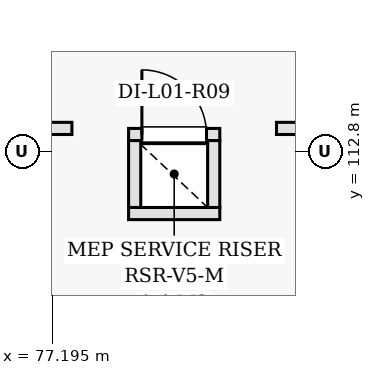
"""IFC4 building model, lengths in metres.
Left out: names, types, materials, properties, quantities, classifications, styles, units other than length and angle.
Written with IfcOpenShell. Run it as: python <this file> out.ifc"""

import sys

from ifc_helpers import new_model, si_unit, direction, frame, frame_2d, origin, place, context, subcontext, project, spatial, rectangle, extrude, element, fill, save


model = new_model("IFC4")
c1 = context("Model", 3, precision=1e-05, world=origin(), true_north=direction((0.0, 1.0)))
c2 = subcontext(c1, "Body", "Model", "MODEL_VIEW")
j1 = project(units=[si_unit("LENGTHUNIT", "METRE"), si_unit("PLANEANGLEUNIT", "RADIAN")], contexts=[c1])
p1 = place(None, origin())
s1 = spatial("IfcSite", under=j1, at=p1, CompositionType="ELEMENT")
p2 = place(p1, origin())
s2 = spatial("IfcBuilding", under=s1, at=p2, CompositionType="ELEMENT")
p3 = place(p2, frame((0.0, 0.0, 4.8)))
s3 = spatial("IfcBuildingStorey", under=s2, at=p3, CompositionType="ELEMENT", Elevation=4.8)
p4 = place(p3, frame((78.2, 111.98, 0.0), z_axis=(0.0, 0.0, 1.0), x_axis=(1.0, 0.0, 0.0)))
e1 = element("IfcWall", 1, at=p4, inside=s3, PredefinedType="PARTITIONING", context=c2, shape_type="SweptSolid", body=[
    extrude(rectangle(XDim=1.2, YDim=0.16, at=frame_2d((0.6, 0.0))), origin(), (0.0, 0.0, 1.0), 4.48),
])
p5 = place(p3, frame((78.2, 113.02, 0.0), z_axis=(0.0, 0.0, 1.0), x_axis=(1.0, 0.0, 0.0)))
e2 = element("IfcWall", 2, at=p5, inside=s3, PredefinedType="PARTITIONING", context=c2, shape_type="SweptSolid", body=[
    extrude(rectangle(XDim=1.2, YDim=0.16, at=frame_2d((0.6, 0.0))), origin(), (0.0, 0.0, 1.0), 4.48),
])
p6 = place(p5, frame((0.175, 0.0, 0.0)))
e3 = element("IfcOpeningElement", 3, at=p6, cuts=e2, PredefinedType="OPENING", context=c2, shape_type="SweptSolid", body=[
    extrude(rectangle(XDim=0.85, YDim=2.02, at=frame_2d((0.425, 1.01))), frame((0.0, 0.09, 0.0), z_axis=(0.0, -1.0, 0.0), x_axis=(1.0, 0.0, 0.0)), (0.0, 0.0, 1.0), 0.18),
])
for number, where, z_axis, x_axis in (
    (4, (78.28, 112.06, 0.0), (0.0, 0.0, 1.0), (0.0, 1.0, 0.0)),
    (5, (79.32, 112.06, 0.0), (0.0, 0.0, 1.0), (0.0, 1.0, 0.0)),
):
    element("IfcWall", number, at=place(p3, frame(where, z_axis=z_axis, x_axis=x_axis)), inside=s3, PredefinedType="PARTITIONING", context=c2, shape_type="SweptSolid", body=[
        extrude(rectangle(XDim=0.88, YDim=0.16, at=frame_2d((0.44, 0.0))), origin(), (0.0, 0.0, 1.0), 4.48),
    ])
p7 = place(p3, frame((80.146, 113.1, 0.0), z_axis=(0.0, 0.0, 1.0), x_axis=(1.0, 0.0, 0.0)))
e6 = element("IfcWall", 6, at=p7, inside=s3, PredefinedType="PARTITIONING", context=c2, shape_type="SweptSolid", body=[
    extrude(rectangle(XDim=4.834, YDim=0.16, at=frame_2d((2.417, 0.0))), origin(), (0.0, 0.0, 1.0), 3.815),
])
p8 = place(p3, frame((39.44, 113.1, 0.0), z_axis=(0.0, 0.0, 1.0), x_axis=(1.0, 0.0, 0.0)))
e7 = element("IfcWall", 7, at=p8, inside=s3, PredefinedType="PARTITIONING", context=c2, shape_type="SweptSolid", body=[
    extrude(rectangle(XDim=38.014, YDim=0.16, at=frame_2d((19.007, 0.0))), origin(), (0.0, 0.0, 1.0), 3.565),
])
p9 = place(p6, origin())
e8 = element("IfcDoor", 8, at=p9, inside=s3, OperationType="SINGLE_SWING_LEFT", PredefinedType="DOOR", context=c2, shape_type="SweptSolid", body=[
    extrude(rectangle(XDim=0.85, YDim=2.02, at=frame_2d((0.425, 1.01))), frame((0.0, 0.025, 0.0), z_axis=(0.0, -1.0, 0.0), x_axis=(1.0, 0.0, 0.0)), (0.0, 0.0, 1.0), 0.05),
])
fill(e3, e8)
save(model, sys.argv[1])
